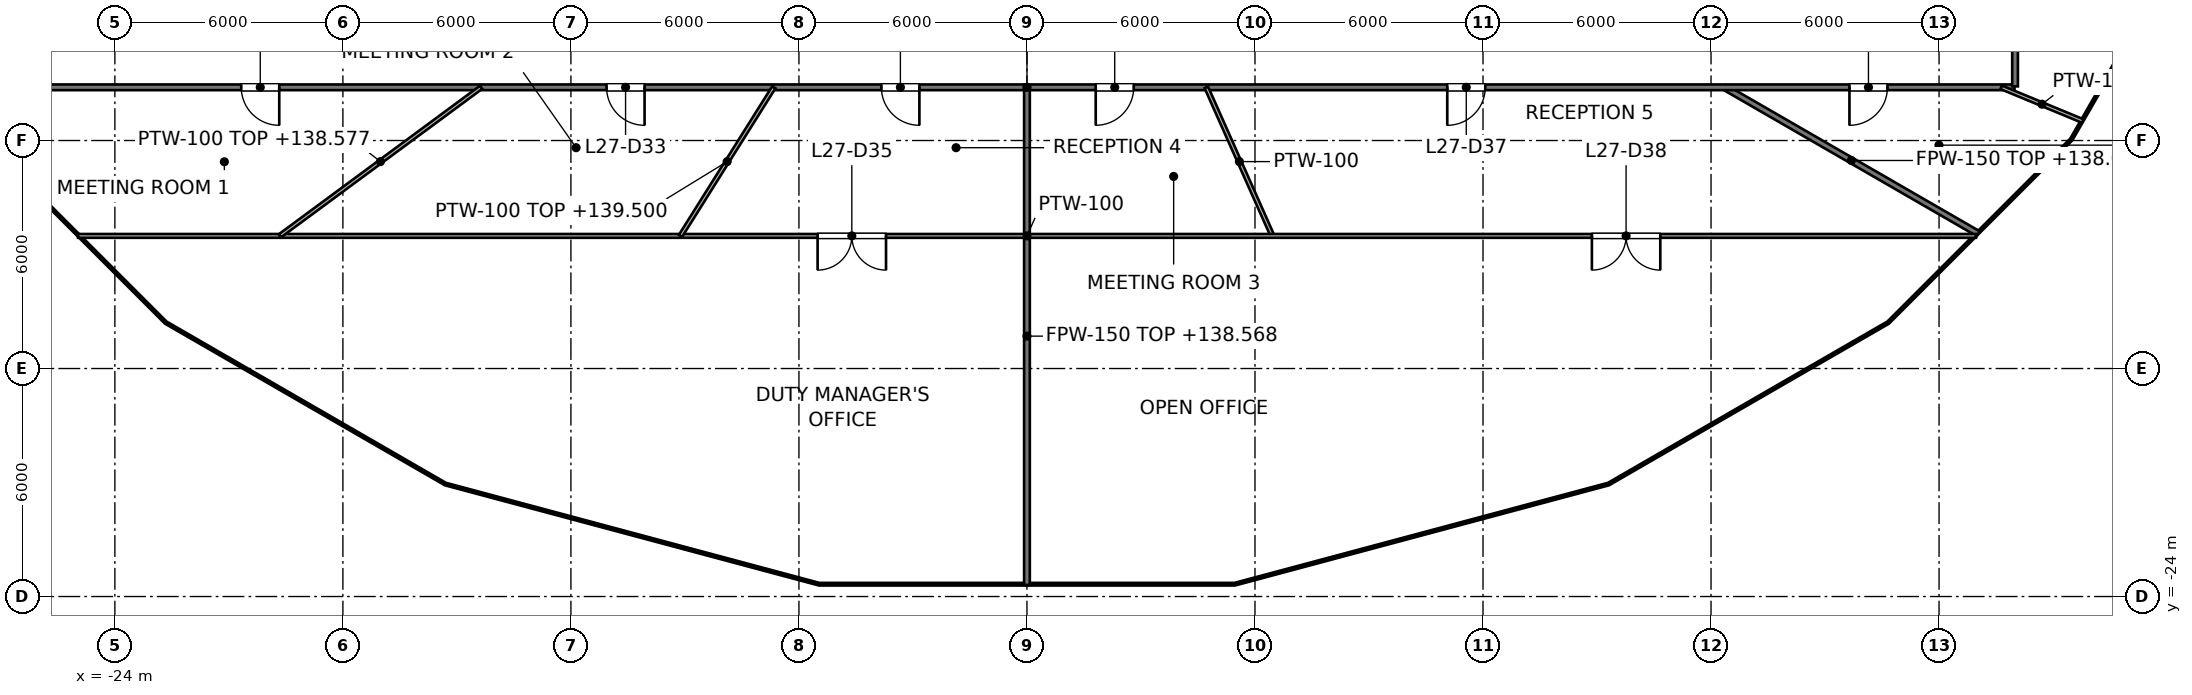
"""IFC4 building model, lengths in metres.
Left out: names, types, materials, properties, quantities, classifications, styles, units other than length and angle.
Written with IfcOpenShell. Run it as: python <this file> out.ifc"""

import sys

from ifc_helpers import new_model, si_unit, direction, frame, frame_2d, origin, place, context, subcontext, project, spatial, rectangle, extrude, element, fill, save


model = new_model("IFC4")
c1 = context("Model", 3, precision=1e-05, world=origin(), true_north=direction((0.0, 1.0)))
c2 = subcontext(c1, "Body", "Model", "MODEL_VIEW")
j1 = project(units=[si_unit("LENGTHUNIT", "METRE"), si_unit("PLANEANGLEUNIT", "RADIAN")], contexts=[c1])
p1 = place(None, origin())
s1 = spatial("IfcSite", under=j1, at=p1, CompositionType="ELEMENT")
p2 = place(p1, origin())
s2 = spatial("IfcBuilding", under=s1, at=p2, CompositionType="ELEMENT")
p3 = place(p2, frame((0.0, 0.0, 135.6)))
s3 = spatial("IfcBuildingStorey", under=s2, at=p3, CompositionType="ELEMENT", Elevation=135.6)
p4 = place(p3, frame((18.359, -10.6, 0.0), z_axis=(0.0, 0.0, 1.0), x_axis=(0.866036201792, -0.499981296836, 0.0)))
e1 = element("IfcWall", 1, at=p4, inside=s3, PredefinedType="PARTITIONING", context=c2, shape_type="SweptSolid", body=[
    extrude(rectangle(XDim=7.702, YDim=0.15, at=frame_2d((3.851, 0.0))), origin(), (0.0, 0.0, 1.0), 3.045),
])
p5 = place(p3, frame((-25.986, -10.6, 0.0), z_axis=(0.0, 0.0, 1.0), x_axis=(1.0, 0.0, 0.0)))
e2 = element("IfcWall", 2, at=p5, inside=s3, PredefinedType="PARTITIONING", context=c2, shape_type="SweptSolid", body=[
    extrude(rectangle(XDim=51.972, YDim=0.15, at=frame_2d((25.986, 0.0))), origin(), (0.0, 0.0, 1.0), 2.968),
])
p6 = place(p5, frame((47.628, 0.0, 0.0)))
e3 = element("IfcOpeningElement", 3, at=p6, cuts=e2, PredefinedType="OPENING", context=c2, shape_type="SweptSolid", body=[
    extrude(rectangle(XDim=1.0, YDim=2.1, at=frame_2d((0.5, 1.05))), frame((0.0, 0.075, 0.0), z_axis=(0.0, -1.0, 0.0), x_axis=(1.0, 0.0, 0.0)), (0.0, 0.0, 1.0), 0.15),
])
p7 = place(p5, frame((5.312, 0.0, 0.0)))
e4 = element("IfcOpeningElement", 4, at=p7, cuts=e2, PredefinedType="OPENING", context=c2, shape_type="SweptSolid", body=[
    extrude(rectangle(XDim=1.0, YDim=2.1, at=frame_2d((0.5, 1.05))), frame((0.0, 0.075, 0.0), z_axis=(0.0, -1.0, 0.0), x_axis=(1.0, 0.0, 0.0)), (0.0, 0.0, 1.0), 0.15),
])
p8 = place(p5, frame((14.924, 0.0, 0.0)))
e5 = element("IfcOpeningElement", 5, at=p8, cuts=e2, PredefinedType="OPENING", context=c2, shape_type="SweptSolid", body=[
    extrude(rectangle(XDim=1.0, YDim=2.1, at=frame_2d((0.5, 1.05))), frame((0.0, 0.075, 0.0), z_axis=(0.0, -1.0, 0.0), x_axis=(1.0, 0.0, 0.0)), (0.0, 0.0, 1.0), 0.15),
])
p9 = place(p5, frame((22.156, 0.0, 0.0)))
e6 = element("IfcOpeningElement", 6, at=p9, cuts=e2, PredefinedType="OPENING", context=c2, shape_type="SweptSolid", body=[
    extrude(rectangle(XDim=1.0, YDim=2.1, at=frame_2d((0.5, 1.05))), frame((0.0, 0.075, 0.0), z_axis=(0.0, -1.0, 0.0), x_axis=(1.0, 0.0, 0.0)), (0.0, 0.0, 1.0), 0.15),
])
p10 = place(p5, frame((27.795, 0.0, 0.0)))
e7 = element("IfcOpeningElement", 7, at=p10, cuts=e2, PredefinedType="OPENING", context=c2, shape_type="SweptSolid", body=[
    extrude(rectangle(XDim=1.0, YDim=2.1, at=frame_2d((0.5, 1.05))), frame((0.0, 0.075, 0.0), z_axis=(0.0, -1.0, 0.0), x_axis=(1.0, 0.0, 0.0)), (0.0, 0.0, 1.0), 0.15),
])
p11 = place(p5, frame((37.045, 0.0, 0.0)))
e8 = element("IfcOpeningElement", 8, at=p11, cuts=e2, PredefinedType="OPENING", context=c2, shape_type="SweptSolid", body=[
    extrude(rectangle(XDim=1.0, YDim=2.1, at=frame_2d((0.5, 1.05))), frame((0.0, 0.075, 0.0), z_axis=(0.0, -1.0, 0.0), x_axis=(1.0, 0.0, 0.0)), (0.0, 0.0, 1.0), 0.15),
])
p12 = place(p3, frame((26.0, -10.575, 0.0), z_axis=(0.0, 0.0, 1.0), x_axis=(0.0, 1.0, 0.0)))
e9 = element("IfcWall", 9, at=p12, inside=s3, PredefinedType="PARTITIONING", context=c2, shape_type="SweptSolid", body=[
    extrude(rectangle(XDim=2.775, YDim=0.15, at=frame_2d((1.387, 0.0))), origin(), (0.0, 0.0, 1.0), 2.977),
])
p13 = place(p3, frame((0.0, -23.696, 0.0), z_axis=(0.0, 0.0, 1.0), x_axis=(0.0, 1.0, 0.0)))
e10 = element("IfcWall", 10, at=p13, inside=s3, PredefinedType="PARTITIONING", context=c2, shape_type="SweptSolid", body=[
    extrude(rectangle(XDim=13.096, YDim=0.15, at=frame_2d((6.548, 0.0))), origin(), (0.0, 0.0, 1.0), 2.968),
])
p14 = place(p3, frame((4.719, -10.6, 0.0), z_axis=(0.0, 0.0, 1.0), x_axis=(0.406768186446, -0.913531412977, 0.0)))
e11 = element("IfcWall", 11, at=p14, inside=s3, PredefinedType="PARTITIONING", context=c2, shape_type="SweptSolid", body=[
    extrude(rectangle(XDim=4.28, YDim=0.1, at=frame_2d((2.14, 0.0))), origin(), (0.0, 0.0, 1.0), 2.968),
])
p15 = place(p3, frame((25.635, -10.6, 0.0), z_axis=(0.0, 0.0, 1.0), x_axis=(0.924087226733, -0.382181628796, 0.0)))
e12 = element("IfcWall", 12, at=p15, inside=s3, PredefinedType="PARTITIONING", context=c2, shape_type="SweptSolid", body=[
    extrude(rectangle(XDim=2.323, YDim=0.1, at=frame_2d((1.162, 0.0))), origin(), (0.0, 0.0, 1.0), 3.525),
])
p16 = place(p3, frame((-24.97, -14.51, 0.0), z_axis=(0.0, 0.0, 1.0), x_axis=(1.0, 0.0, 0.0)))
e13 = element("IfcWall", 13, at=p16, inside=s3, PredefinedType="PARTITIONING", context=c2, shape_type="SweptSolid", body=[
    extrude(rectangle(XDim=49.94, YDim=0.1, at=frame_2d((24.97, 0.0))), origin(), (0.0, 0.0, 1.0), 2.968),
])
p17 = place(p16, frame((19.461, 0.0, 0.0)))
e14 = element("IfcOpeningElement", 14, at=p17, cuts=e13, PredefinedType="OPENING", context=c2, shape_type="SweptSolid", body=[
    extrude(rectangle(XDim=1.8, YDim=2.1, at=frame_2d((0.9, 1.05))), frame((0.0, 0.05, 0.0), z_axis=(0.0, -1.0, 0.0), x_axis=(1.0, 0.0, 0.0)), (0.0, 0.0, 1.0), 0.1),
])
p18 = place(p16, frame((39.835, 0.0, 0.0)))
e15 = element("IfcOpeningElement", 15, at=p18, cuts=e13, PredefinedType="OPENING", context=c2, shape_type="SweptSolid", body=[
    extrude(rectangle(XDim=1.8, YDim=2.1, at=frame_2d((0.9, 1.05))), frame((0.0, 0.05, 0.0), z_axis=(0.0, -1.0, 0.0), x_axis=(1.0, 0.0, 0.0)), (0.0, 0.0, 1.0), 0.1),
])
p19 = place(p3, frame((-19.661, -14.51, 0.0), z_axis=(0.0, 0.0, 1.0), x_axis=(0.804603605329, 0.593812292136, 0.0)))
e16 = element("IfcWall", 16, at=p19, inside=s3, PredefinedType="PARTITIONING", context=c2, shape_type="SweptSolid", body=[
    extrude(rectangle(XDim=6.584, YDim=0.1, at=frame_2d((3.292, 0.0))), origin(), (0.0, 0.0, 1.0), 2.977),
])
p20 = place(p3, frame((-9.117, -14.51, 0.0), z_axis=(0.0, 0.0, 1.0), x_axis=(0.531922462086, 0.846793064643, 0.0)))
e17 = element("IfcWall", 17, at=p20, inside=s3, PredefinedType="PARTITIONING", context=c2, shape_type="SweptSolid", body=[
    extrude(rectangle(XDim=4.617, YDim=0.1, at=frame_2d((2.309, 0.0))), origin(), (0.0, 0.0, 1.0), 3.9),
])
p21 = place(p6, origin())
e18 = element("IfcDoor", 18, at=p21, inside=s3, OperationType="SINGLE_SWING_LEFT", PredefinedType="DOOR", context=c2, shape_type="SweptSolid", body=[
    extrude(rectangle(XDim=1.0, YDim=2.1, at=frame_2d((0.5, 1.05))), frame((0.0, 0.025, 0.0), z_axis=(0.0, -1.0, 0.0), x_axis=(1.0, 0.0, 0.0)), (0.0, 0.0, 1.0), 0.05),
])
fill(e3, e18)
p22 = place(p7, origin())
e19 = element("IfcDoor", 19, at=p22, inside=s3, OperationType="SINGLE_SWING_RIGHT", PredefinedType="DOOR", context=c2, shape_type="SweptSolid", body=[
    extrude(rectangle(XDim=1.0, YDim=2.1, at=frame_2d((0.5, 1.05))), frame((0.0, 0.025, 0.0), z_axis=(0.0, -1.0, 0.0), x_axis=(1.0, 0.0, 0.0)), (0.0, 0.0, 1.0), 0.05),
])
fill(e4, e19)
p23 = place(p8, origin())
e20 = element("IfcDoor", 20, at=p23, inside=s3, OperationType="SINGLE_SWING_RIGHT", PredefinedType="DOOR", context=c2, shape_type="SweptSolid", body=[
    extrude(rectangle(XDim=1.0, YDim=2.1, at=frame_2d((0.5, 1.05))), frame((0.0, 0.025, 0.0), z_axis=(0.0, -1.0, 0.0), x_axis=(1.0, 0.0, 0.0)), (0.0, 0.0, 1.0), 0.05),
])
fill(e5, e20)
p24 = place(p9, origin())
e21 = element("IfcDoor", 21, at=p24, inside=s3, OperationType="SINGLE_SWING_RIGHT", PredefinedType="DOOR", context=c2, shape_type="SweptSolid", body=[
    extrude(rectangle(XDim=1.0, YDim=2.1, at=frame_2d((0.5, 1.05))), frame((0.0, 0.025, 0.0), z_axis=(0.0, -1.0, 0.0), x_axis=(1.0, 0.0, 0.0)), (0.0, 0.0, 1.0), 0.05),
])
fill(e6, e21)
p25 = place(p17, origin())
e22 = element("IfcDoor", 22, at=p25, inside=s3, OperationType="DOUBLE_DOOR_SINGLE_SWING", PredefinedType="DOOR", context=c2, shape_type="SweptSolid", body=[
    extrude(rectangle(XDim=1.8, YDim=2.1, at=frame_2d((0.9, 1.05))), frame((0.0, 0.025, 0.0), z_axis=(0.0, -1.0, 0.0), x_axis=(1.0, 0.0, 0.0)), (0.0, 0.0, 1.0), 0.05),
])
fill(e14, e22)
p26 = place(p10, origin())
e23 = element("IfcDoor", 23, at=p26, inside=s3, OperationType="SINGLE_SWING_LEFT", PredefinedType="DOOR", context=c2, shape_type="SweptSolid", body=[
    extrude(rectangle(XDim=1.0, YDim=2.1, at=frame_2d((0.5, 1.05))), frame((0.0, 0.025, 0.0), z_axis=(0.0, -1.0, 0.0), x_axis=(1.0, 0.0, 0.0)), (0.0, 0.0, 1.0), 0.05),
])
fill(e7, e23)
p27 = place(p11, origin())
e24 = element("IfcDoor", 24, at=p27, inside=s3, OperationType="SINGLE_SWING_LEFT", PredefinedType="DOOR", context=c2, shape_type="SweptSolid", body=[
    extrude(rectangle(XDim=1.0, YDim=2.1, at=frame_2d((0.5, 1.05))), frame((0.0, 0.025, 0.0), z_axis=(0.0, -1.0, 0.0), x_axis=(1.0, 0.0, 0.0)), (0.0, 0.0, 1.0), 0.05),
])
fill(e8, e24)
p28 = place(p18, origin())
e25 = element("IfcDoor", 25, at=p28, inside=s3, OperationType="DOUBLE_DOOR_SINGLE_SWING", PredefinedType="DOOR", context=c2, shape_type="SweptSolid", body=[
    extrude(rectangle(XDim=1.8, YDim=2.1, at=frame_2d((0.9, 1.05))), frame((0.0, 0.025, 0.0), z_axis=(0.0, -1.0, 0.0), x_axis=(1.0, 0.0, 0.0)), (0.0, 0.0, 1.0), 0.05),
])
fill(e15, e25)
save(model, sys.argv[1])
